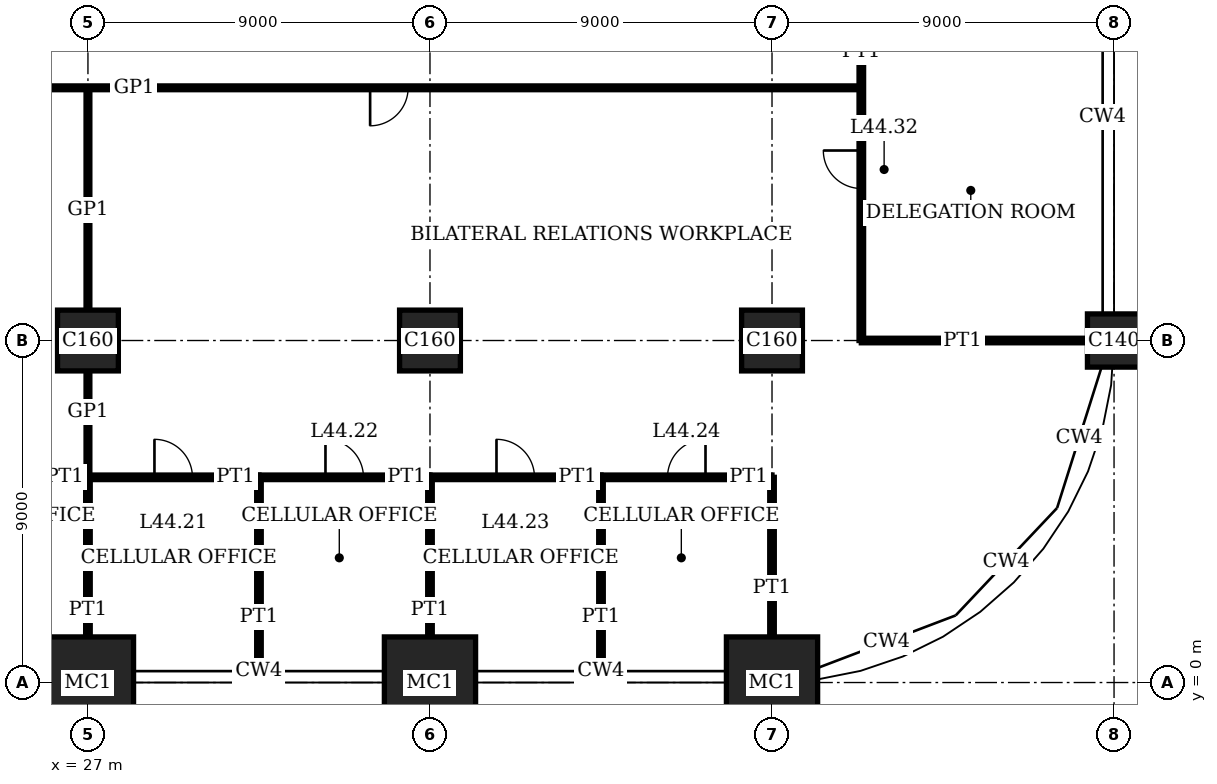
"""IFC4 building model, lengths in metres.
Left out: names, types, materials, properties, quantities, classifications, styles, units other than length and angle.
Written with IfcOpenShell. Run it as: python <this file> out.ifc"""

import sys

from ifc_helpers import new_model, si_unit, direction, frame, frame_2d, origin, origin_2d, place, context, subcontext, project, spatial, rectangle, extrude, element, fill, save


model = new_model("IFC4")
c1 = context("Model", 3, precision=1e-05, world=origin(), true_north=direction((0.0, 1.0)))
c2 = subcontext(c1, "Body", "Model", "MODEL_VIEW")
j1 = project(units=[si_unit("LENGTHUNIT", "METRE"), si_unit("PLANEANGLEUNIT", "RADIAN")], contexts=[c1])
p1 = place(None, origin())
s1 = spatial("IfcSite", under=j1, at=p1, CompositionType="ELEMENT")
p2 = place(p1, origin())
s2 = spatial("IfcBuilding", under=s1, at=p2, CompositionType="ELEMENT")
p3 = place(p2, frame((0.0, 0.0, 182.2)))
s3 = spatial("IfcBuildingStorey", under=s2, at=p3, CompositionType="ELEMENT", Elevation=182.2)
p4 = place(p3, frame((27.0, 0.0, 0.0), z_axis=(0.0, 0.0, 1.0), x_axis=(1.0, 0.0, 0.0)))
e1 = element("IfcColumn", 1, at=p4, inside=s3, PredefinedType="COLUMN", context=c2, shape_type="SweptSolid", body=[
    extrude(rectangle(XDim=2.4, YDim=2.4, at=origin_2d()), origin(), (0.0, 0.0, 1.0), 4.0),
])
p5 = place(p3, frame((27.0, 9.0, 0.0), z_axis=(0.0, 0.0, 1.0), x_axis=(1.0, 0.0, 0.0)))
e2 = element("IfcColumn", 2, at=p5, inside=s3, PredefinedType="COLUMN", context=c2, shape_type="SweptSolid", body=[
    extrude(rectangle(XDim=1.6, YDim=1.6, at=origin_2d()), origin(), (0.0, 0.0, 1.0), 4.0),
])
p6 = place(p3, frame((36.0, 0.0, 0.0), z_axis=(0.0, 0.0, 1.0), x_axis=(1.0, 0.0, 0.0)))
e3 = element("IfcColumn", 3, at=p6, inside=s3, PredefinedType="COLUMN", context=c2, shape_type="SweptSolid", body=[
    extrude(rectangle(XDim=2.4, YDim=2.4, at=origin_2d()), origin(), (0.0, 0.0, 1.0), 4.0),
])
p7 = place(p3, frame((36.0, 9.0, 0.0), z_axis=(0.0, 0.0, 1.0), x_axis=(1.0, 0.0, 0.0)))
e4 = element("IfcColumn", 4, at=p7, inside=s3, PredefinedType="COLUMN", context=c2, shape_type="SweptSolid", body=[
    extrude(rectangle(XDim=1.6, YDim=1.6, at=origin_2d()), origin(), (0.0, 0.0, 1.0), 4.0),
])
p8 = place(p3, frame((45.0, 0.0, 0.0), z_axis=(0.0, 0.0, 1.0), x_axis=(1.0, 0.0, 0.0)))
e5 = element("IfcColumn", 5, at=p8, inside=s3, PredefinedType="COLUMN", context=c2, shape_type="SweptSolid", body=[
    extrude(rectangle(XDim=2.4, YDim=2.4, at=origin_2d()), origin(), (0.0, 0.0, 1.0), 4.0),
])
p9 = place(p3, frame((45.0, 9.0, 0.0), z_axis=(0.0, 0.0, 1.0), x_axis=(1.0, 0.0, 0.0)))
e6 = element("IfcColumn", 6, at=p9, inside=s3, PredefinedType="COLUMN", context=c2, shape_type="SweptSolid", body=[
    extrude(rectangle(XDim=1.6, YDim=1.6, at=origin_2d()), origin(), (0.0, 0.0, 1.0), 4.0),
])
p10 = place(p3, frame((54.0, 9.0, 0.0), z_axis=(0.0, 0.0, 1.0), x_axis=(1.0, 0.0, 0.0)))
e7 = element("IfcColumn", 7, at=p10, inside=s3, PredefinedType="COLUMN", context=c2, shape_type="SweptSolid", body=[
    extrude(rectangle(XDim=1.4, YDim=1.4, at=origin_2d()), origin(), (0.0, 0.0, 1.0), 4.0),
])
p11 = place(p3, frame((22.5, 5.4, 0.0), z_axis=(0.0, 0.0, 1.0), x_axis=(1.0, 0.0, 0.0)))
e8 = element("IfcWall", 8, at=p11, inside=s3, PredefinedType="PARTITIONING", context=c2, shape_type="SweptSolid", body=[
    extrude(rectangle(XDim=4.5, YDim=0.12, at=frame_2d((2.25, 0.0))), origin(), (0.0, 0.0, 1.0), 3.75),
])
p12 = place(p11, frame((1.75, 0.0, 0.0)))
e9 = element("IfcOpeningElement", 9, at=p12, cuts=e8, PredefinedType="OPENING", context=c2, shape_type="SweptSolid", body=[
    extrude(rectangle(XDim=1.0, YDim=2.4, at=frame_2d((0.5, 1.2))), frame((0.0, 0.07, 0.0), z_axis=(0.0, -1.0, 0.0), x_axis=(1.0, 0.0, 0.0)), (0.0, 0.0, 1.0), 0.14),
])
p13 = place(p3, frame((27.0, 5.4, 0.0), z_axis=(0.0, 0.0, 1.0), x_axis=(1.0, 0.0, 0.0)))
e10 = element("IfcWall", 10, at=p13, inside=s3, PredefinedType="PARTITIONING", context=c2, shape_type="SweptSolid", body=[
    extrude(rectangle(XDim=4.5, YDim=0.12, at=frame_2d((2.25, 0.0))), origin(), (0.0, 0.0, 1.0), 3.75),
])
p14 = place(p13, frame((1.75, 0.0, 0.0)))
e11 = element("IfcOpeningElement", 11, at=p14, cuts=e10, PredefinedType="OPENING", context=c2, shape_type="SweptSolid", body=[
    extrude(rectangle(XDim=1.0, YDim=2.4, at=frame_2d((0.5, 1.2))), frame((0.0, 0.07, 0.0), z_axis=(0.0, -1.0, 0.0), x_axis=(1.0, 0.0, 0.0)), (0.0, 0.0, 1.0), 0.14),
])
p15 = place(p3, frame((31.5, 5.4, 0.0), z_axis=(0.0, 0.0, 1.0), x_axis=(1.0, 0.0, 0.0)))
e12 = element("IfcWall", 12, at=p15, inside=s3, PredefinedType="PARTITIONING", context=c2, shape_type="SweptSolid", body=[
    extrude(rectangle(XDim=4.5, YDim=0.12, at=frame_2d((2.25, 0.0))), origin(), (0.0, 0.0, 1.0), 3.75),
])
p16 = place(p15, frame((1.75, 0.0, 0.0)))
e13 = element("IfcOpeningElement", 13, at=p16, cuts=e12, PredefinedType="OPENING", context=c2, shape_type="SweptSolid", body=[
    extrude(rectangle(XDim=1.0, YDim=2.4, at=frame_2d((0.5, 1.2))), frame((0.0, 0.07, 0.0), z_axis=(0.0, -1.0, 0.0), x_axis=(1.0, 0.0, 0.0)), (0.0, 0.0, 1.0), 0.14),
])
p17 = place(p3, frame((36.0, 5.4, 0.0), z_axis=(0.0, 0.0, 1.0), x_axis=(1.0, 0.0, 0.0)))
e14 = element("IfcWall", 14, at=p17, inside=s3, PredefinedType="PARTITIONING", context=c2, shape_type="SweptSolid", body=[
    extrude(rectangle(XDim=4.5, YDim=0.12, at=frame_2d((2.25, 0.0))), origin(), (0.0, 0.0, 1.0), 3.75),
])
p18 = place(p17, frame((1.75, 0.0, 0.0)))
e15 = element("IfcOpeningElement", 15, at=p18, cuts=e14, PredefinedType="OPENING", context=c2, shape_type="SweptSolid", body=[
    extrude(rectangle(XDim=1.0, YDim=2.4, at=frame_2d((0.5, 1.2))), frame((0.0, 0.07, 0.0), z_axis=(0.0, -1.0, 0.0), x_axis=(1.0, 0.0, 0.0)), (0.0, 0.0, 1.0), 0.14),
])
p19 = place(p3, frame((40.5, 5.4, 0.0), z_axis=(0.0, 0.0, 1.0), x_axis=(1.0, 0.0, 0.0)))
e16 = element("IfcWall", 16, at=p19, inside=s3, PredefinedType="PARTITIONING", context=c2, shape_type="SweptSolid", body=[
    extrude(rectangle(XDim=4.5, YDim=0.12, at=frame_2d((2.25, 0.0))), origin(), (0.0, 0.0, 1.0), 3.75),
])
p20 = place(p19, frame((1.75, 0.0, 0.0)))
e17 = element("IfcOpeningElement", 17, at=p20, cuts=e16, PredefinedType="OPENING", context=c2, shape_type="SweptSolid", body=[
    extrude(rectangle(XDim=1.0, YDim=2.4, at=frame_2d((0.5, 1.2))), frame((0.0, 0.07, 0.0), z_axis=(0.0, -1.0, 0.0), x_axis=(1.0, 0.0, 0.0)), (0.0, 0.0, 1.0), 0.14),
])
p21 = place(p3, frame((47.35, 9.0, 0.0), z_axis=(0.0, 0.0, 1.0), x_axis=(1.0, 0.0, 0.0)))
e18 = element("IfcWall", 18, at=p21, inside=s3, PredefinedType="PARTITIONING", context=c2, shape_type="SweptSolid", body=[
    extrude(rectangle(XDim=5.95, YDim=0.12, at=frame_2d((2.975, 0.0))), origin(), (0.0, 0.0, 1.0), 3.05),
])
p22 = place(p3, frame((22.5, 15.65, 0.0), z_axis=(0.0, 0.0, 1.0), x_axis=(1.0, 0.0, 0.0)))
e19 = element("IfcWall", 19, at=p22, inside=s3, PredefinedType="PARTITIONING", context=c2, shape_type="SweptSolid", body=[
    extrude(rectangle(XDim=24.85, YDim=0.1, at=frame_2d((12.425, 0.0))), origin(), (0.0, 0.0, 1.0), 3.75),
])
p23 = place(p22, frame((11.925, 0.0, 0.0)))
e20 = element("IfcOpeningElement", 20, at=p23, cuts=e19, PredefinedType="OPENING", context=c2, shape_type="SweptSolid", body=[
    extrude(rectangle(XDim=1.0, YDim=2.4, at=frame_2d((0.5, 1.2))), frame((0.0, 0.06, 0.0), z_axis=(0.0, -1.0, 0.0), x_axis=(1.0, 0.0, 0.0)), (0.0, 0.0, 1.0), 0.12),
])
p24 = place(p3, frame((27.0, 1.2, 0.0), z_axis=(0.0, 0.0, 1.0), x_axis=(0.0, 1.0, 0.0)))
e21 = element("IfcWall", 21, at=p24, inside=s3, PredefinedType="PARTITIONING", context=c2, shape_type="SweptSolid", body=[
    extrude(rectangle(XDim=4.2, YDim=0.12, at=frame_2d((2.1, 0.0))), origin(), (0.0, 0.0, 1.0), 3.05),
])
p25 = place(p3, frame((27.0, 5.4, 0.0), z_axis=(0.0, 0.0, 1.0), x_axis=(0.0, 1.0, 0.0)))
e22 = element("IfcWall", 22, at=p25, inside=s3, PredefinedType="PARTITIONING", context=c2, shape_type="SweptSolid", body=[
    extrude(rectangle(XDim=2.8, YDim=0.1, at=frame_2d((1.4, 0.0))), origin(), (0.0, 0.0, 1.0), 3.05),
])
p26 = place(p3, frame((27.0, 9.8, 0.0), z_axis=(0.0, 0.0, 1.0), x_axis=(0.0, 1.0, 0.0)))
e23 = element("IfcWall", 23, at=p26, inside=s3, PredefinedType="PARTITIONING", context=c2, shape_type="SweptSolid", body=[
    extrude(rectangle(XDim=5.85, YDim=0.1, at=frame_2d((2.925, 0.0))), origin(), (0.0, 0.0, 1.0), 3.05),
])
p27 = place(p3, frame((31.5, 0.31, 0.0), z_axis=(0.0, 0.0, 1.0), x_axis=(0.0, 1.0, 0.0)))
e24 = element("IfcWall", 24, at=p27, inside=s3, PredefinedType="PARTITIONING", context=c2, shape_type="SweptSolid", body=[
    extrude(rectangle(XDim=5.09, YDim=0.12, at=frame_2d((2.545, 0.0))), origin(), (0.0, 0.0, 1.0), 3.75),
])
p28 = place(p3, frame((36.0, 1.2, 0.0), z_axis=(0.0, 0.0, 1.0), x_axis=(0.0, 1.0, 0.0)))
e25 = element("IfcWall", 25, at=p28, inside=s3, PredefinedType="PARTITIONING", context=c2, shape_type="SweptSolid", body=[
    extrude(rectangle(XDim=4.2, YDim=0.12, at=frame_2d((2.1, 0.0))), origin(), (0.0, 0.0, 1.0), 3.05),
])
p29 = place(p3, frame((40.5, 0.31, 0.0), z_axis=(0.0, 0.0, 1.0), x_axis=(0.0, 1.0, 0.0)))
e26 = element("IfcWall", 26, at=p29, inside=s3, PredefinedType="PARTITIONING", context=c2, shape_type="SweptSolid", body=[
    extrude(rectangle(XDim=5.09, YDim=0.12, at=frame_2d((2.545, 0.0))), origin(), (0.0, 0.0, 1.0), 3.75),
])
p30 = place(p3, frame((45.0, 1.2, 0.0), z_axis=(0.0, 0.0, 1.0), x_axis=(0.0, 1.0, 0.0)))
e27 = element("IfcWall", 27, at=p30, inside=s3, PredefinedType="PARTITIONING", context=c2, shape_type="SweptSolid", body=[
    extrude(rectangle(XDim=4.2, YDim=0.12, at=frame_2d((2.1, 0.0))), origin(), (0.0, 0.0, 1.0), 3.05),
])
p31 = place(p3, frame((47.35, 9.0, 0.0), z_axis=(0.0, 0.0, 1.0), x_axis=(0.0, 1.0, 0.0)))
e28 = element("IfcWall", 28, at=p31, inside=s3, PredefinedType="PARTITIONING", context=c2, shape_type="SweptSolid", body=[
    extrude(rectangle(XDim=9.0, YDim=0.12, at=frame_2d((4.5, 0.0))), origin(), (0.0, 0.0, 1.0), 3.75),
])
p32 = place(p31, frame((4.0, 0.0, 0.0)))
e29 = element("IfcOpeningElement", 29, at=p32, cuts=e28, PredefinedType="OPENING", context=c2, shape_type="SweptSolid", body=[
    extrude(rectangle(XDim=1.0, YDim=2.4, at=frame_2d((0.5, 1.2))), frame((0.0, 0.07, 0.0), z_axis=(0.0, -1.0, 0.0), x_axis=(1.0, 0.0, 0.0)), (0.0, 0.0, 1.0), 0.14),
])
p33 = place(p14, origin())
e30 = element("IfcDoor", 30, at=p33, inside=s3, OperationType="SINGLE_SWING_RIGHT", PredefinedType="DOOR", context=c2, shape_type="SweptSolid", body=[
    extrude(rectangle(XDim=1.0, YDim=2.4, at=frame_2d((0.5, 1.2))), frame((0.0, 0.025, 0.0), z_axis=(0.0, -1.0, 0.0), x_axis=(1.0, 0.0, 0.0)), (0.0, 0.0, 1.0), 0.05),
])
fill(e11, e30)
p34 = place(p16, origin())
e31 = element("IfcDoor", 31, at=p34, inside=s3, OperationType="SINGLE_SWING_RIGHT", PredefinedType="DOOR", context=c2, shape_type="SweptSolid", body=[
    extrude(rectangle(XDim=1.0, YDim=2.4, at=frame_2d((0.5, 1.2))), frame((0.0, 0.025, 0.0), z_axis=(0.0, -1.0, 0.0), x_axis=(1.0, 0.0, 0.0)), (0.0, 0.0, 1.0), 0.05),
])
fill(e13, e31)
p35 = place(p18, origin())
e32 = element("IfcDoor", 32, at=p35, inside=s3, OperationType="SINGLE_SWING_RIGHT", PredefinedType="DOOR", context=c2, shape_type="SweptSolid", body=[
    extrude(rectangle(XDim=1.0, YDim=2.4, at=frame_2d((0.5, 1.2))), frame((0.0, 0.025, 0.0), z_axis=(0.0, -1.0, 0.0), x_axis=(1.0, 0.0, 0.0)), (0.0, 0.0, 1.0), 0.05),
])
fill(e15, e32)
p36 = place(p20, origin())
e33 = element("IfcDoor", 33, at=p36, inside=s3, OperationType="SINGLE_SWING_LEFT", PredefinedType="DOOR", context=c2, shape_type="SweptSolid", body=[
    extrude(rectangle(XDim=1.0, YDim=2.4, at=frame_2d((0.5, 1.2))), frame((0.0, 0.025, 0.0), z_axis=(0.0, -1.0, 0.0), x_axis=(1.0, 0.0, 0.0)), (0.0, 0.0, 1.0), 0.05),
])
fill(e17, e33)
p37 = place(p23, origin())
e34 = element("IfcDoor", 34, at=p37, inside=s3, OperationType="SINGLE_SWING_LEFT", PredefinedType="DOOR", context=c2, shape_type="SweptSolid", body=[
    extrude(rectangle(XDim=1.0, YDim=2.4, at=frame_2d((0.5, 1.2))), frame((0.0, 0.02, 0.0), z_axis=(0.0, -1.0, 0.0), x_axis=(1.0, 0.0, 0.0)), (0.0, 0.0, 1.0), 0.04),
])
fill(e20, e34)
p38 = place(p32, origin())
e35 = element("IfcDoor", 35, at=p38, inside=s3, OperationType="SINGLE_SWING_LEFT", PredefinedType="DOOR", context=c2, shape_type="SweptSolid", body=[
    extrude(rectangle(XDim=1.0, YDim=2.4, at=frame_2d((0.5, 1.2))), frame((0.0, 0.025, 0.0), z_axis=(0.0, -1.0, 0.0), x_axis=(1.0, 0.0, 0.0)), (0.0, 0.0, 1.0), 0.05),
])
fill(e29, e35)
save(model, sys.argv[1])
